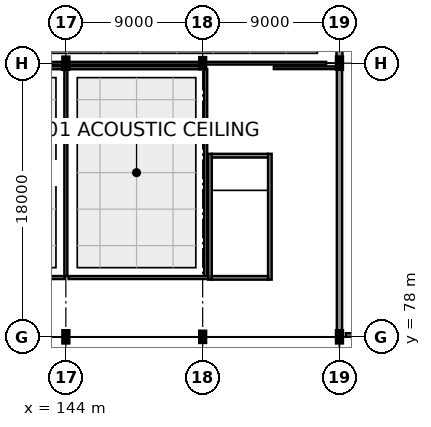
"""IFC4 building model, lengths in metres.
Left out: names, types, materials, properties, quantities, classifications, styles, units other than length and angle.
Written with IfcOpenShell. Run it as: python <this file> out.ifc"""

import sys

from ifc_helpers import new_model, si_unit, direction, frame, frame_2d, origin, origin_2d, place, context, subcontext, project, spatial, rectangle, i_section, extrude, element, fill, save


model = new_model("IFC4")
c1 = context("Model", 3, precision=1e-05, world=origin(), true_north=direction((0.0, 1.0)))
c2 = subcontext(c1, "Body", "Model", "MODEL_VIEW")
j1 = project(units=[si_unit("LENGTHUNIT", "METRE"), si_unit("PLANEANGLEUNIT", "RADIAN")], contexts=[c1])
p1 = place(None, origin())
s1 = spatial("IfcSite", under=j1, at=p1, CompositionType="ELEMENT")
p2 = place(p1, origin())
s2 = spatial("IfcBuilding", under=s1, at=p2, CompositionType="ELEMENT")
p3 = place(p2, origin())
s3 = spatial("IfcBuildingStorey", under=s2, at=p3, CompositionType="ELEMENT", Elevation=0.0)
for number, where, z_axis, x_axis in (
    (1, (144.0, 78.0, 0.0), (0.0, 0.0, 1.0), (1.0, 0.0, 0.0)),
    (2, (144.0, 96.0, 0.0), (0.0, 0.0, 1.0), (1.0, 0.0, 0.0)),
):
    element("IfcColumn", number, at=place(p3, frame(where, z_axis=z_axis, x_axis=x_axis)), inside=s3, PredefinedType="COLUMN", context=c2, shape_type="SweptSolid", body=[
        extrude(i_section(OverallWidth=0.304, OverallDepth=0.716, WebThickness=0.021, FlangeThickness=0.04, at=origin_2d()), origin(), (0.0, 0.0, 1.0), 5.4),
    ])
for number, where, z_axis, x_axis in (
    (3, (153.0, 78.0, 0.0), (0.0, 0.0, 1.0), (0.0, 1.0, 0.0)),
    (4, (153.0, 96.0, 0.0), (0.0, 0.0, 1.0), (1.0, 0.0, 0.0)),
):
    element("IfcColumn", number, at=place(p3, frame(where, z_axis=z_axis, x_axis=x_axis)), inside=s3, PredefinedType="COLUMN", context=c2, shape_type="SweptSolid", body=[
        extrude(i_section(OverallWidth=0.3, OverallDepth=0.65, WebThickness=0.016, FlangeThickness=0.031, at=origin_2d()), origin(), (0.0, 0.0, 1.0), 5.4),
    ])
for number, where, z_axis, x_axis in (
    (5, (162.0, 78.0, 0.0), (0.0, 0.0, 1.0), (1.0, 0.0, 0.0)),
    (6, (162.0, 96.0, 0.0), (0.0, 0.0, 1.0), (1.0, 0.0, 0.0)),
):
    element("IfcColumn", number, at=place(p3, frame(where, z_axis=z_axis, x_axis=x_axis)), inside=s3, PredefinedType="COLUMN", context=c2, shape_type="SweptSolid", body=[
        extrude(i_section(OverallWidth=0.304, OverallDepth=0.716, WebThickness=0.021, FlangeThickness=0.04, at=origin_2d()), origin(), (0.0, 0.0, 1.0), 5.4),
    ])
p4 = place(p3, frame((162.0, 78.356, 0.0), z_axis=(0.0, 0.0, 1.0), x_axis=(0.0, 1.0, 0.0)))
e7 = element("IfcWall", 7, at=p4, inside=s3, PredefinedType="SOLIDWALL", context=c2, shape_type="SweptSolid", body=[
    extrude(rectangle(XDim=17.288, YDim=0.35, at=frame_2d((8.644, 0.0))), origin(), (0.0, 0.0, 1.0), 4.295),
])
p5 = place(p4, frame((5.244, 0.0, 0.0)))
e8 = element("IfcOpeningElement", 8, at=p5, cuts=e7, PredefinedType="OPENING", context=c2, shape_type="SweptSolid", body=[
    extrude(rectangle(XDim=1.8, YDim=2.4, at=frame_2d((0.9, 1.2))), frame((0.0, 0.19, 0.0), z_axis=(0.0, -1.0, 0.0), x_axis=(1.0, 0.0, 0.0)), (0.0, 0.0, 1.0), 0.38),
])
p6 = place(p3, frame((162.0, 96.356, 0.0), z_axis=(0.0, 0.0, 1.0), x_axis=(0.0, 1.0, 0.0)))
e9 = element("IfcWall", 9, at=p6, inside=s3, PredefinedType="SOLIDWALL", context=c2, shape_type="SweptSolid", body=[
    extrude(rectangle(XDim=11.506, YDim=0.4, at=frame_2d((5.753, 0.0))), origin(), (0.0, 0.0, 1.0), 5.08),
])
p7 = place(p6, frame((2.322, 0.0, 2.35)))
e10 = element("IfcOpeningElement", 10, at=p7, cuts=e9, PredefinedType="OPENING", context=c2, shape_type="SweptSolid", body=[
    extrude(rectangle(XDim=1.8, YDim=0.75, at=frame_2d((0.9, 0.375))), frame((0.0, 0.215, 0.0), z_axis=(0.0, -1.0, 0.0), x_axis=(1.0, 0.0, 0.0)), (0.0, 0.0, 1.0), 0.43),
])
p8 = place(p6, frame((7.384, 0.0, 2.35)))
e11 = element("IfcOpeningElement", 11, at=p8, cuts=e9, PredefinedType="OPENING", context=c2, shape_type="SweptSolid", body=[
    extrude(rectangle(XDim=1.8, YDim=0.75, at=frame_2d((0.9, 0.375))), frame((0.0, 0.215, 0.0), z_axis=(0.0, -1.0, 0.0), x_axis=(1.0, 0.0, 0.0)), (0.0, 0.0, 1.0), 0.43),
])
p9 = place(p3, frame((162.42, 78.12, 0.0), z_axis=(0.0, 0.0, 1.0), x_axis=(1.0, 0.0, 0.0)))
e12 = element("IfcWall", 12, at=p9, inside=s3, PredefinedType="PARAPET", context=c2, shape_type="SweptSolid", body=[
    extrude(rectangle(XDim=8.16, YDim=0.24, at=frame_2d((4.08, 0.0))), origin(), (0.0, 0.0, 1.0), 0.9),
])
p10 = place(p3, frame((153.48, 81.76, 0.0), z_axis=(0.0, 0.0, 1.0), x_axis=(0.0, 1.0, 0.0)))
e13 = element("IfcWall", 13, at=p10, inside=s3, PredefinedType="SHEAR", context=c2, shape_type="SweptSolid", body=[
    extrude(rectangle(XDim=8.28, YDim=0.24, at=frame_2d((4.14, 0.0))), origin(), (0.0, 0.0, 1.0), 5.21),
])
p11 = place(p3, frame((157.42, 81.76, 0.0), z_axis=(0.0, 0.0, 1.0), x_axis=(0.0, 1.0, 0.0)))
e14 = element("IfcWall", 14, at=p11, inside=s3, PredefinedType="SHEAR", context=c2, shape_type="SweptSolid", body=[
    extrude(rectangle(XDim=8.28, YDim=0.24, at=frame_2d((4.14, 0.0))), origin(), (0.0, 0.0, 1.0), 5.21),
])
p12 = place(p11, frame((0.49, 0.0, 0.0)))
e15 = element("IfcOpeningElement", 15, at=p12, cuts=e14, PredefinedType="OPENING", context=c2, shape_type="SweptSolid", body=[
    extrude(rectangle(XDim=1.3, YDim=2.2, at=frame_2d((0.65, 1.1))), frame((0.0, 0.135, 0.0), z_axis=(0.0, -1.0, 0.0), x_axis=(1.0, 0.0, 0.0)), (0.0, 0.0, 1.0), 0.27),
])
for number, where, z_axis, x_axis in (
    (16, (153.6, 81.88, 0.0), (0.0, 0.0, 1.0), (1.0, 0.0, 0.0)),
    (17, (153.6, 89.92, 0.0), (0.0, 0.0, 1.0), (1.0, 0.0, 0.0)),
):
    element("IfcWall", number, at=place(p3, frame(where, z_axis=z_axis, x_axis=x_axis)), inside=s3, PredefinedType="SHEAR", context=c2, shape_type="SweptSolid", body=[
        extrude(rectangle(XDim=3.7, YDim=0.24, at=frame_2d((1.85, 0.0))), origin(), (0.0, 0.0, 1.0), 5.21),
    ])
p13 = place(p3, frame((157.68, 95.7, 0.0), z_axis=(0.0, 0.0, 1.0), x_axis=(1.0, 0.0, 0.0)))
e18 = element("IfcWall", 18, at=p13, inside=s3, PredefinedType="PARTITIONING", context=c2, shape_type="SweptSolid", body=[
    extrude(rectangle(XDim=4.04, YDim=0.18, at=frame_2d((2.02, 0.0))), origin(), (0.0, 0.0, 1.0), 5.04),
])
p14 = place(p3, frame((126.28, 95.7, 0.0), z_axis=(0.0, 0.0, 1.0), x_axis=(1.0, 0.0, 0.0)))
e19 = element("IfcWall", 19, at=p14, inside=s3, PredefinedType="PARTITIONING", context=c2, shape_type="SweptSolid", body=[
    extrude(rectangle(XDim=17.64, YDim=0.2, at=frame_2d((8.82, 0.0))), origin(), (0.0, 0.0, 1.0), 5.04),
])
p15 = place(p3, frame((144.0, 95.62, 0.0), z_axis=(0.0, 0.0, 1.0), x_axis=(0.0, -1.0, 0.0)))
e20 = element("IfcWall", 20, at=p15, inside=s3, PredefinedType="PARTITIONING", context=c2, shape_type="SweptSolid", body=[
    extrude(rectangle(XDim=13.64, YDim=0.2, at=frame_2d((6.82, 0.0))), origin(), (0.0, 0.0, 1.0), 4.405),
])
p16 = place(p3, frame((143.92, 81.9, 0.0), z_axis=(0.0, 0.0, 1.0), x_axis=(-1.0, 0.0, 0.0)))
e21 = element("IfcWall", 21, at=p16, inside=s3, PredefinedType="PARTITIONING", context=c2, shape_type="SweptSolid", body=[
    extrude(rectangle(XDim=18.035, YDim=0.2, at=frame_2d((9.018, 0.0))), origin(), (0.0, 0.0, 1.0), 5.04),
])
p17 = place(p16, frame((8.017, 0.0, 0.0)))
e22 = element("IfcOpeningElement", 22, at=p17, cuts=e21, PredefinedType="OPENING", context=c2, shape_type="SweptSolid", body=[
    extrude(rectangle(XDim=2.0, YDim=2.6, at=frame_2d((1.0, 1.3))), frame((0.0, 0.115, 0.0), z_axis=(0.0, -1.0, 0.0), x_axis=(1.0, 0.0, 0.0)), (0.0, 0.0, 1.0), 0.23),
])
p18 = place(p16, frame((15.385, 0.0, 1.05)))
e23 = element("IfcOpeningElement", 23, at=p18, cuts=e21, PredefinedType="OPENING", context=c2, shape_type="SweptSolid", body=[
    extrude(rectangle(XDim=1.8, YDim=1.1, at=frame_2d((0.9, 0.55))), frame((0.0, 0.115, 0.0), z_axis=(0.0, -1.0, 0.0), x_axis=(1.0, 0.0, 0.0)), (0.0, 0.0, 1.0), 0.23),
])
p19 = place(p3, frame((153.2, 95.62, 0.0), z_axis=(0.0, 0.0, 1.0), x_axis=(0.0, -1.0, 0.0)))
e24 = element("IfcWall", 24, at=p19, inside=s3, PredefinedType="PARTITIONING", context=c2, shape_type="SweptSolid", body=[
    extrude(rectangle(XDim=13.64, YDim=0.2, at=frame_2d((6.82, 0.0))), origin(), (0.0, 0.0, 1.0), 4.305),
])
p20 = place(p3, frame((153.365, 81.9, 0.0), z_axis=(0.0, 0.0, 1.0), x_axis=(-1.0, 0.0, 0.0)))
e25 = element("IfcWall", 25, at=p20, inside=s3, PredefinedType="PARTITIONING", context=c2, shape_type="SweptSolid", body=[
    extrude(rectangle(XDim=9.185, YDim=0.2, at=frame_2d((4.593, 0.0))), origin(), (0.0, 0.0, 1.0), 5.04),
])
p21 = place(p20, frame((3.643, 0.0, 0.0)))
e26 = element("IfcOpeningElement", 26, at=p21, cuts=e25, PredefinedType="OPENING", context=c2, shape_type="SweptSolid", body=[
    extrude(rectangle(XDim=1.9, YDim=2.5, at=frame_2d((0.95, 1.25))), frame((0.0, 0.115, 0.0), z_axis=(0.0, -1.0, 0.0), x_axis=(1.0, 0.0, 0.0)), (0.0, 0.0, 1.0), 0.23),
])
p22 = place(p20, frame((6.835, 0.0, 1.05)))
e27 = element("IfcOpeningElement", 27, at=p22, cuts=e25, PredefinedType="OPENING", context=c2, shape_type="SweptSolid", body=[
    extrude(rectangle(XDim=1.5, YDim=1.1, at=frame_2d((0.75, 0.55))), frame((0.0, 0.115, 0.0), z_axis=(0.0, -1.0, 0.0), x_axis=(1.0, 0.0, 0.0)), (0.0, 0.0, 1.0), 0.23),
])
p23 = place(p3, frame((144.18, 95.7, 0.0), z_axis=(0.0, 0.0, 1.0), x_axis=(1.0, 0.0, 0.0)))
e28 = element("IfcWall", 28, at=p23, inside=s3, PredefinedType="PARTITIONING", context=c2, shape_type="SweptSolid", body=[
    extrude(rectangle(XDim=8.94, YDim=0.2, at=frame_2d((4.47, 0.0))), origin(), (0.0, 0.0, 1.0), 5.04),
])
p24 = place(p3, frame((161.12, 96.0, 0.0), z_axis=(0.0, 0.0, 1.0), x_axis=(-1.0, 0.0, 0.0)))
e29 = element("IfcWall", 29, at=p24, inside=s3, PredefinedType="PARTITIONING", context=c2, shape_type="SweptSolid", body=[
    extrude(rectangle(XDim=35.04, YDim=0.18, at=frame_2d((17.52, 0.0))), origin(), (0.0, 0.0, 1.0), 4.545),
])
p25 = place(p24, frame((5.732, 0.0, 0.0)))
e30 = element("IfcOpeningElement", 30, at=p25, cuts=e29, PredefinedType="OPENING", context=c2, shape_type="SweptSolid", body=[
    extrude(rectangle(XDim=1.15, YDim=2.15, at=frame_2d((0.575, 1.075))), frame((0.0, 0.105, 0.0), z_axis=(0.0, -1.0, 0.0), x_axis=(1.0, 0.0, 0.0)), (0.0, 0.0, 1.0), 0.21),
])
p26 = place(p5, frame((1.8, 0.0, 0.0), z_axis=(0.0, 0.0, 1.0), x_axis=(-1.0, 0.0, 0.0)))
e31 = element("IfcDoor", 31, at=p26, inside=s3, OperationType="DOUBLE_DOOR_SINGLE_SWING", PredefinedType="DOOR", context=c2, shape_type="SweptSolid", body=[
    extrude(rectangle(XDim=1.8, YDim=2.4, at=frame_2d((0.9, 1.2))), frame((0.0, 0.025, 0.0), z_axis=(0.0, -1.0, 0.0), x_axis=(1.0, 0.0, 0.0)), (0.0, 0.0, 1.0), 0.05),
])
fill(e8, e31)
p27 = place(p12, frame((1.3, 0.0, 0.0), z_axis=(0.0, 0.0, 1.0), x_axis=(-1.0, 0.0, 0.0)))
e32 = element("IfcDoor", 32, at=p27, inside=s3, OperationType="SINGLE_SWING_LEFT", PredefinedType="DOOR", context=c2, shape_type="SweptSolid", body=[
    extrude(rectangle(XDim=1.3, YDim=2.2, at=frame_2d((0.65, 1.1))), frame((0.0, 0.025, 0.0), z_axis=(0.0, -1.0, 0.0), x_axis=(1.0, 0.0, 0.0)), (0.0, 0.0, 1.0), 0.05),
])
fill(e15, e32)
p28 = place(p21, origin())
e33 = element("IfcDoor", 33, at=p28, inside=s3, OperationType="DOUBLE_DOOR_SINGLE_SWING", PredefinedType="DOOR", context=c2, shape_type="SweptSolid", body=[
    extrude(rectangle(XDim=1.9, YDim=2.5, at=frame_2d((0.95, 1.25))), frame((0.0, 0.025, 0.0), z_axis=(0.0, -1.0, 0.0), x_axis=(1.0, 0.0, 0.0)), (0.0, 0.0, 1.0), 0.05),
])
fill(e26, e33)
p29 = place(p22, origin())
e34 = element("IfcWindow", 34, at=p29, inside=s3, PartitioningType="SINGLE_PANEL", PredefinedType="WINDOW", context=c2, shape_type="SweptSolid", body=[
    extrude(rectangle(XDim=1.5, YDim=1.1, at=frame_2d((0.75, 0.55))), frame((0.0, 0.03, 0.0), z_axis=(0.0, -1.0, 0.0), x_axis=(1.0, 0.0, 0.0)), (0.0, 0.0, 1.0), 0.06),
])
fill(e27, e34)
p30 = place(p25, frame((1.15, 0.0, 0.0), z_axis=(0.0, 0.0, 1.0), x_axis=(-1.0, 0.0, 0.0)))
e35 = element("IfcDoor", 35, at=p30, inside=s3, OperationType="SINGLE_SWING_LEFT", PredefinedType="DOOR", context=c2, shape_type="SweptSolid", body=[
    extrude(rectangle(XDim=1.15, YDim=2.15, at=frame_2d((0.575, 1.075))), frame((0.0, 0.025, 0.0), z_axis=(0.0, -1.0, 0.0), x_axis=(1.0, 0.0, 0.0)), (0.0, 0.0, 1.0), 0.05),
])
fill(e30, e35)
save(model, sys.argv[1])
